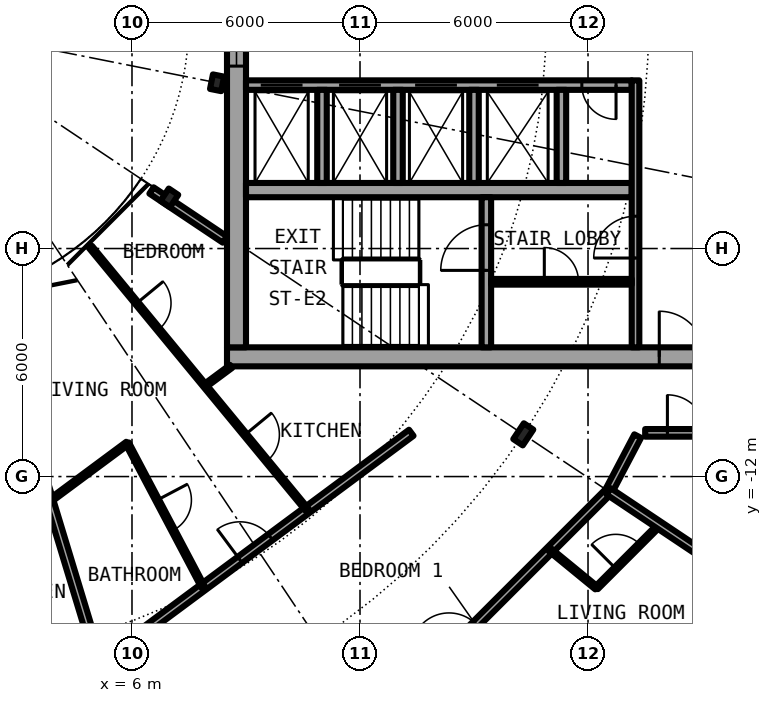
"""IFC4 building model, lengths in metres.
Left out: names, types, materials, properties, quantities, classifications, styles, units other than length and angle.
Written with IfcOpenShell. Run it as: python <this file> out.ifc"""

import sys

from ifc_helpers import new_model, si_unit, direction, frame, frame_2d, origin, origin_2d, place, context, subcontext, project, spatial, rectangle, i_section, extrude, element, fill, save


model = new_model("IFC4")
c1 = context("Model", 3, precision=1e-05, world=origin(), true_north=direction((0.0, 1.0)))
c2 = subcontext(c1, "Body", "Model", "MODEL_VIEW")
j1 = project(units=[si_unit("LENGTHUNIT", "METRE"), si_unit("PLANEANGLEUNIT", "RADIAN")], contexts=[c1])
p1 = place(None, origin())
s1 = spatial("IfcSite", under=j1, at=p1, CompositionType="ELEMENT")
p2 = place(p1, origin())
s2 = spatial("IfcBuilding", under=s1, at=p2, CompositionType="ELEMENT")
p3 = place(p2, frame((0.0, 0.0, 170.75)))
s3 = spatial("IfcBuildingStorey", under=s2, at=p3, CompositionType="ELEMENT", Elevation=170.75)
p4 = place(p3, frame((16.297, -10.889, 0.0), z_axis=(0.0, 0.0, 1.0), x_axis=(0.831469612303, -0.55557023302, 0.0)))
e1 = element("IfcColumn", 1, at=p4, inside=s3, PredefinedType="COLUMN", context=c2, shape_type="SweptSolid", body=[
    extrude(i_section(OverallWidth=0.3, OverallDepth=0.5, WebThickness=0.014, FlangeThickness=0.028, FilletRadius=0.027, at=origin_2d()), origin(), (0.0, 0.0, 1.0), 3.05),
])
for number, where, z_axis, x_axis in (
    (2, (6.984, -4.667, 0.0), (0.0, 0.0, 1.0), (0.831, -0.556, 0.0)),
    (3, (8.239, -1.639, 0.0), (0.0, 0.0, 1.0), (0.981, -0.195, 0.0)),
):
    element("IfcColumn", number, at=place(p3, frame(where, z_axis=z_axis, x_axis=x_axis)), inside=s3, PredefinedType="COLUMN", context=c2, shape_type="SweptSolid", body=[
        extrude(i_section(OverallWidth=0.3, OverallDepth=0.39, WebThickness=0.011, FlangeThickness=0.019, FilletRadius=0.027, at=origin_2d()), origin(), (0.0, 0.0, 1.0), 3.05),
    ])
p5 = place(p3, frame((19.304, -19.304, 0.0), z_axis=(0.0, 0.0, 1.0), x_axis=(0.634382322723, 0.773019449054, 0.0)))
e4 = element("IfcWall", 4, at=p5, inside=s3, PredefinedType="SOLIDWALL", context=c2, shape_type="SweptSolid", body=[
    extrude(rectangle(XDim=5.352, YDim=0.25, at=frame_2d((2.676, 0.0))), origin(), (0.0, 0.0, 1.0), 2.7),
])
p6 = place(p5, frame((0.841, 0.0, 0.0)))
e5 = element("IfcOpeningElement", 5, at=p6, cuts=e4, PredefinedType="OPENING", context=c2, shape_type="SweptSolid", body=[
    extrude(rectangle(XDim=1.0, YDim=2.2, at=frame_2d((0.5, 1.1))), frame((0.0, 0.135, 0.0), z_axis=(0.0, -1.0, 0.0), x_axis=(1.0, 0.0, 0.0)), (0.0, 0.0, 1.0), 0.27),
])
p7 = place(p5, frame((3.111, 0.0, 0.3)))
e6 = element("IfcOpeningElement", 6, at=p7, cuts=e4, PredefinedType="OPENING", context=c2, shape_type="SweptSolid", body=[
    extrude(rectangle(XDim=1.8, YDim=2.1, at=frame_2d((0.9, 1.05))), frame((0.0, 0.135, 0.0), z_axis=(0.0, -1.0, 0.0), x_axis=(1.0, 0.0, 0.0)), (0.0, 0.0, 1.0), 0.27),
])
p8 = place(p3, frame((8.5, -8.85, 0.0), z_axis=(0.0, 0.0, 1.0), x_axis=(1.0, 0.0, 0.0)))
e7 = element("IfcWall", 7, at=p8, inside=s3, PredefinedType="SHEAR", context=c2, shape_type="SweptSolid", body=[
    extrude(rectangle(XDim=13.6, YDim=0.5, at=frame_2d((6.8, 0.0))), origin(), (0.0, 0.0, 1.0), 3.05),
])
p9 = place(p8, frame((11.375, 0.0, 0.0)))
e8 = element("IfcOpeningElement", 8, at=p9, cuts=e7, PredefinedType="OPENING", context=c2, shape_type="SweptSolid", body=[
    extrude(rectangle(XDim=1.2, YDim=2.3, at=frame_2d((0.6, 1.15))), frame((0.0, 0.26, 0.0), z_axis=(0.0, -1.0, 0.0), x_axis=(1.0, 0.0, 0.0)), (0.0, 0.0, 1.0), 0.52),
])
p10 = place(p3, frame((8.75, -8.6, 0.0), z_axis=(0.0, 0.0, 1.0), x_axis=(0.0, 1.0, 0.0)))
e9 = element("IfcWall", 9, at=p10, inside=s3, PredefinedType="SHEAR", context=c2, shape_type="SweptSolid", body=[
    extrude(rectangle(XDim=17.2, YDim=0.5, at=frame_2d((8.6, 0.0))), origin(), (0.0, 0.0, 1.0), 3.05),
])
p11 = place(p10, frame((7.4, 0.0, 0.1)))
e10 = element("IfcOpeningElement", 10, at=p11, cuts=e9, PredefinedType="OPENING", context=c2, shape_type="SweptSolid", body=[
    extrude(rectangle(XDim=2.4, YDim=2.2, at=frame_2d((1.2, 1.1))), frame((0.0, 0.26, 0.0), z_axis=(0.0, -1.0, 0.0), x_axis=(1.0, 0.0, 0.0)), (0.0, 0.0, 1.0), 0.52),
])
p12 = place(p3, frame((19.15, -1.7, 0.0), z_axis=(0.0, 0.0, 1.0), x_axis=(-1.0, 0.0, 0.0)))
e11 = element("IfcWall", 11, at=p12, inside=s3, PredefinedType="SHEAR", context=c2, shape_type="SweptSolid", body=[
    extrude(rectangle(XDim=10.15, YDim=0.25, at=frame_2d((5.075, 0.0))), origin(), (0.0, 0.0, 1.0), 3.05),
])
p13 = place(p12, frame((8.663, 0.0, 0.0)))
e12 = element("IfcOpeningElement", 12, at=p13, cuts=e11, PredefinedType="OPENING", context=c2, shape_type="SweptSolid", body=[
    extrude(rectangle(XDim=1.1, YDim=2.3, at=frame_2d((0.55, 1.15))), frame((0.0, 0.135, 0.0), z_axis=(0.0, -1.0, 0.0), x_axis=(1.0, 0.0, 0.0)), (0.0, 0.0, 1.0), 0.27),
])
p14 = place(p12, frame((6.6, 0.0, 0.0)))
e13 = element("IfcOpeningElement", 13, at=p14, cuts=e11, PredefinedType="OPENING", context=c2, shape_type="SweptSolid", body=[
    extrude(rectangle(XDim=1.1, YDim=2.3, at=frame_2d((0.55, 1.15))), frame((0.0, 0.135, 0.0), z_axis=(0.0, -1.0, 0.0), x_axis=(1.0, 0.0, 0.0)), (0.0, 0.0, 1.0), 0.27),
])
p15 = place(p12, frame((4.6, 0.0, 0.0)))
e14 = element("IfcOpeningElement", 14, at=p15, cuts=e11, PredefinedType="OPENING", context=c2, shape_type="SweptSolid", body=[
    extrude(rectangle(XDim=1.1, YDim=2.3, at=frame_2d((0.55, 1.15))), frame((0.0, 0.135, 0.0), z_axis=(0.0, -1.0, 0.0), x_axis=(1.0, 0.0, 0.0)), (0.0, 0.0, 1.0), 0.27),
])
p16 = place(p12, frame((2.45, 0.0, 0.0)))
e15 = element("IfcOpeningElement", 15, at=p16, cuts=e11, PredefinedType="OPENING", context=c2, shape_type="SweptSolid", body=[
    extrude(rectangle(XDim=1.1, YDim=2.3, at=frame_2d((0.55, 1.15))), frame((0.0, 0.135, 0.0), z_axis=(0.0, -1.0, 0.0), x_axis=(1.0, 0.0, 0.0)), (0.0, 0.0, 1.0), 0.27),
])
p17 = place(p12, frame((0.413, 0.0, 0.0)))
e16 = element("IfcOpeningElement", 16, at=p17, cuts=e11, PredefinedType="OPENING", context=c2, shape_type="SweptSolid", body=[
    extrude(rectangle(XDim=0.9, YDim=2.3, at=frame_2d((0.45, 1.15))), frame((0.0, 0.135, 0.0), z_axis=(0.0, -1.0, 0.0), x_axis=(1.0, 0.0, 0.0)), (0.0, 0.0, 1.0), 0.27),
])
p18 = place(p3, frame((9.0, -4.462, 0.0), z_axis=(0.0, 0.0, 1.0), x_axis=(1.0, 0.0, 0.0)))
e17 = element("IfcWall", 17, at=p18, inside=s3, PredefinedType="SHEAR", context=c2, shape_type="SweptSolid", body=[
    extrude(rectangle(XDim=10.15, YDim=0.375, at=frame_2d((5.075, 0.0))), origin(), (0.0, 0.0, 1.0), 3.05),
])
p19 = place(p3, frame((15.325, -8.6, 0.0), z_axis=(0.0, 0.0, 1.0), x_axis=(0.0, 1.0, 0.0)))
e18 = element("IfcWall", 18, at=p19, inside=s3, PredefinedType="SHEAR", context=c2, shape_type="SweptSolid", body=[
    extrude(rectangle(XDim=3.95, YDim=0.25, at=frame_2d((1.975, 0.0))), origin(), (0.0, 0.0, 1.0), 3.05),
])
p20 = place(p19, frame((2.025, 0.0, 0.0)))
e19 = element("IfcOpeningElement", 19, at=p20, cuts=e18, PredefinedType="OPENING", context=c2, shape_type="SweptSolid", body=[
    extrude(rectangle(XDim=1.2, YDim=2.3, at=frame_2d((0.6, 1.15))), frame((0.0, 0.135, 0.0), z_axis=(0.0, -1.0, 0.0), x_axis=(1.0, 0.0, 0.0)), (0.0, 0.0, 1.0), 0.27),
])
for number, where, z_axis, x_axis in (
    (20, (15.0, -1.825, 0.0), (0.0, 0.0, 1.0), (0.0, -1.0, 0.0)),
    (21, (17.3, -1.825, 0.0), (0.0, 0.0, 1.0), (0.0, -1.0, 0.0)),
):
    element("IfcWall", number, at=place(p3, frame(where, z_axis=z_axis, x_axis=x_axis)), inside=s3, PredefinedType="SOLIDWALL", context=c2, shape_type="SweptSolid", body=[
        extrude(rectangle(XDim=2.45, YDim=0.25, at=frame_2d((1.225, 0.0))), origin(), (0.0, 0.0, 1.0), 2.7),
    ])
p21 = place(p3, frame((19.25, -8.6, 0.0), z_axis=(0.0, 0.0, 1.0), x_axis=(0.0, 1.0, 0.0)))
e22 = element("IfcWall", 22, at=p21, inside=s3, PredefinedType="SOLIDWALL", context=c2, shape_type="SweptSolid", body=[
    extrude(rectangle(XDim=7.025, YDim=0.2, at=frame_2d((3.513, 0.0))), origin(), (0.0, 0.0, 1.0), 2.7),
])
p22 = place(p21, frame((2.35, 0.0, 0.0)))
e23 = element("IfcOpeningElement", 23, at=p22, cuts=e22, PredefinedType="OPENING", context=c2, shape_type="SweptSolid", body=[
    extrude(rectangle(XDim=1.1, YDim=2.3, at=frame_2d((0.55, 1.15))), frame((0.0, 0.11, 0.0), z_axis=(0.0, -1.0, 0.0), x_axis=(1.0, 0.0, 0.0)), (0.0, 0.0, 1.0), 0.22),
])
for number, where, z_axis, x_axis in (
    (24, (11.0, -1.825, 0.0), (0.0, 0.0, 1.0), (0.0, -1.0, 0.0)),
    (25, (13.0, -1.825, 0.0), (0.0, 0.0, 1.0), (0.0, -1.0, 0.0)),
):
    element("IfcWall", number, at=place(p3, frame(where, z_axis=z_axis, x_axis=x_axis)), inside=s3, PredefinedType="SOLIDWALL", context=c2, shape_type="SweptSolid", body=[
        extrude(rectangle(XDim=2.45, YDim=0.25, at=frame_2d((1.225, 0.0))), origin(), (0.0, 0.0, 1.0), 2.7),
    ])
p23 = place(p3, frame((15.45, -6.875, 0.0), z_axis=(0.0, 0.0, 1.0), x_axis=(1.0, 0.0, 0.0)))
e26 = element("IfcWall", 26, at=p23, inside=s3, PredefinedType="PARTITIONING", context=c2, shape_type="SweptSolid", body=[
    extrude(rectangle(XDim=3.7, YDim=0.15, at=frame_2d((1.85, 0.0))), origin(), (0.0, 0.0, 1.0), 2.7),
])
p24 = place(p23, frame((1.4, 0.0, 0.0)))
e27 = element("IfcOpeningElement", 27, at=p24, cuts=e26, PredefinedType="OPENING", context=c2, shape_type="SweptSolid", body=[
    extrude(rectangle(XDim=0.9, YDim=2.3, at=frame_2d((0.45, 1.15))), frame((0.0, 0.085, 0.0), z_axis=(0.0, -1.0, 0.0), x_axis=(1.0, 0.0, 0.0)), (0.0, 0.0, 1.0), 0.17),
])
p25 = place(p3, frame((18.224, -14.927, 0.0), z_axis=(0.0, 0.0, 1.0), x_axis=(0.706897299114, 0.707316201218, 0.0)))
e28 = element("IfcWall", 28, at=p25, inside=s3, PredefinedType="PARTITIONING", context=c2, shape_type="SweptSolid", body=[
    extrude(rectangle(XDim=2.331, YDim=0.1, at=frame_2d((1.166, 0.0))), origin(), (0.0, 0.0, 1.0), 2.7),
])
p26 = place(p25, frame((0.716, 0.0, 0.0)))
e29 = element("IfcOpeningElement", 29, at=p26, cuts=e28, PredefinedType="OPENING", context=c2, shape_type="SweptSolid", body=[
    extrude(rectangle(XDim=0.9, YDim=2.3, at=frame_2d((0.45, 1.15))), frame((0.0, 0.06, 0.0), z_axis=(0.0, -1.0, 0.0), x_axis=(1.0, 0.0, 0.0)), (0.0, 0.0, 1.0), 0.12),
])
p27 = place(p3, frame((18.542, -12.389, 0.0), z_axis=(0.0, 0.0, 1.0), x_axis=(0.465605550524, 0.884992356646, 0.0)))
e30 = element("IfcWall", 30, at=p27, inside=s3, PredefinedType="PARTITIONING", context=c2, shape_type="SweptSolid", body=[
    extrude(rectangle(XDim=1.643, YDim=0.2, at=frame_2d((0.821, 0.0))), origin(), (0.0, 0.0, 1.0), 2.7),
])
p28 = place(p3, frame((12.389, -18.542, 0.0), z_axis=(0.0, 0.0, 1.0), x_axis=(0.707106781187, 0.707106781187, 0.0)))
e31 = element("IfcWall", 31, at=p28, inside=s3, PredefinedType="PARTITIONING", context=c2, shape_type="SweptSolid", body=[
    extrude(rectangle(XDim=8.702, YDim=0.2, at=frame_2d((4.351, 0.0))), origin(), (0.0, 0.0, 1.0), 2.7),
])
p29 = place(p28, frame((2.763, 0.0, 0.0)))
e32 = element("IfcOpeningElement", 32, at=p29, cuts=e31, PredefinedType="OPENING", context=c2, shape_type="SweptSolid", body=[
    extrude(rectangle(XDim=1.0, YDim=2.3, at=frame_2d((0.5, 1.15))), frame((0.0, 0.11, 0.0), z_axis=(0.0, -1.0, 0.0), x_axis=(1.0, 0.0, 0.0)), (0.0, 0.0, 1.0), 0.22),
])
p30 = place(p3, frame((5.137, -16.938, 0.0), z_axis=(0.0, 0.0, 1.0), x_axis=(0.803229232922, 0.595670042371, 0.0)))
e33 = element("IfcWall", 33, at=p30, inside=s3, PredefinedType="PARTITIONING", context=c2, shape_type="SweptSolid", body=[
    extrude(rectangle(XDim=10.224, YDim=0.2, at=frame_2d((5.112, 0.0))), origin(), (0.0, 0.0, 1.0), 2.7),
])
p31 = place(p30, frame((4.612, 0.0, 0.0)))
e34 = element("IfcOpeningElement", 34, at=p31, cuts=e33, PredefinedType="OPENING", context=c2, shape_type="SweptSolid", body=[
    extrude(rectangle(XDim=1.0, YDim=2.3, at=frame_2d((0.5, 1.15))), frame((0.0, 0.11, 0.0), z_axis=(0.0, -1.0, 0.0), x_axis=(1.0, 0.0, 0.0)), (0.0, 0.0, 1.0), 0.22),
])
p32 = place(p3, frame((3.835, -12.64, 0.0), z_axis=(0.0, 0.0, 1.0), x_axis=(0.803259509791, 0.595629213463, 0.0)))
e35 = element("IfcWall", 35, at=p32, inside=s3, PredefinedType="PARTITIONING", context=c2, shape_type="SweptSolid", body=[
    extrude(rectangle(XDim=2.543, YDim=0.1, at=frame_2d((1.272, 0.0))), origin(), (0.0, 0.0, 1.0), 2.7),
])
p33 = place(p3, frame((7.919, -9.611, 0.0), z_axis=(0.0, 0.0, 1.0), x_axis=(0.803199066515, 0.595710718007, 0.0)))
e36 = element("IfcWall", 36, at=p33, inside=s3, PredefinedType="PARTITIONING", context=c2, shape_type="SweptSolid", body=[
    extrude(rectangle(XDim=0.858, YDim=0.1, at=frame_2d((0.429, 0.0))), origin(), (0.0, 0.0, 1.0), 2.7),
])
p34 = place(p3, frame((19.504, -10.85, 0.0), z_axis=(0.0, 0.0, 1.0), x_axis=(1.0, 0.0, 0.0)))
e37 = element("IfcWall", 37, at=p34, inside=s3, PredefinedType="PARTITIONING", context=c2, shape_type="SweptSolid", body=[
    extrude(rectangle(XDim=2.171, YDim=0.2, at=frame_2d((1.085, 0.0))), origin(), (0.0, 0.0, 1.0), 2.7),
])
p35 = place(p34, frame((0.585, 0.0, 0.0)))
e38 = element("IfcOpeningElement", 38, at=p35, cuts=e37, PredefinedType="OPENING", context=c2, shape_type="SweptSolid", body=[
    extrude(rectangle(XDim=1.0, YDim=2.3, at=frame_2d((0.5, 1.15))), frame((0.0, 0.11, 0.0), z_axis=(0.0, -1.0, 0.0), x_axis=(1.0, 0.0, 0.0)), (0.0, 0.0, 1.0), 0.22),
])
p36 = place(p3, frame((6.513, -4.472, 0.0), z_axis=(0.0, 0.0, 1.0), x_axis=(0.83133816625, -0.555766905579, 0.0)))
e39 = element("IfcWall", 39, at=p36, inside=s3, PredefinedType="PARTITIONING", context=c2, shape_type="SweptSolid", body=[
    extrude(rectangle(XDim=2.323, YDim=0.2, at=frame_2d((1.162, 0.0))), origin(), (0.0, 0.0, 1.0), 2.7),
])
p37 = place(p3, frame((2.241, -7.388, 0.0), z_axis=(0.0, 0.0, 1.0), x_axis=(0.290284403441, -0.956940418793, 0.0)))
e40 = element("IfcWall", 40, at=p37, inside=s3, PredefinedType="PARTITIONING", context=c2, shape_type="SweptSolid", body=[
    extrude(rectangle(XDim=9.98, YDim=0.2, at=frame_2d((4.99, 0.0))), origin(), (0.0, 0.0, 1.0), 2.7),
])
p38 = place(p3, frame((4.908, -5.959, 0.0), z_axis=(0.0, 0.0, 1.0), x_axis=(0.636115614725, -0.771593756262, 0.0)))
e41 = element("IfcWall", 41, at=p38, inside=s3, PredefinedType="PARTITIONING", context=c2, shape_type="SweptSolid", body=[
    extrude(rectangle(XDim=8.967, YDim=0.1, at=frame_2d((4.483, 0.0))), origin(), (0.0, 0.0, 1.0), 2.7),
])
p39 = place(p38, frame((6.4, 0.0, 0.0)))
e42 = element("IfcOpeningElement", 42, at=p39, cuts=e41, PredefinedType="OPENING", context=c2, shape_type="SweptSolid", body=[
    extrude(rectangle(XDim=0.9, YDim=2.3, at=frame_2d((0.45, 1.15))), frame((0.0, 0.06, 0.0), z_axis=(0.0, -1.0, 0.0), x_axis=(1.0, 0.0, 0.0)), (0.0, 0.0, 1.0), 0.12),
])
p40 = place(p38, frame((1.917, 0.0, 0.0)))
e43 = element("IfcOpeningElement", 43, at=p40, cuts=e41, PredefinedType="OPENING", context=c2, shape_type="SweptSolid", body=[
    extrude(rectangle(XDim=0.9, YDim=2.3, at=frame_2d((0.45, 1.15))), frame((0.0, 0.06, 0.0), z_axis=(0.0, -1.0, 0.0), x_axis=(1.0, 0.0, 0.0)), (0.0, 0.0, 1.0), 0.12),
])
p41 = place(p3, frame((5.875, -11.126, 0.0), z_axis=(0.0, 0.0, 1.0), x_axis=(0.467030118529, -0.884241408432, 0.0)))
e44 = element("IfcWall", 44, at=p41, inside=s3, PredefinedType="PARTITIONING", context=c2, shape_type="SweptSolid", body=[
    extrude(rectangle(XDim=4.278, YDim=0.1, at=frame_2d((2.139, 0.0))), origin(), (0.0, 0.0, 1.0), 2.7),
])
p42 = place(p41, frame((1.689, 0.0, 0.0)))
e45 = element("IfcOpeningElement", 45, at=p42, cuts=e44, PredefinedType="OPENING", context=c2, shape_type="SweptSolid", body=[
    extrude(rectangle(XDim=0.9, YDim=2.3, at=frame_2d((0.45, 1.15))), frame((0.0, 0.06, 0.0), z_axis=(0.0, -1.0, 0.0), x_axis=(1.0, 0.0, 0.0)), (0.0, 0.0, 1.0), 0.12),
])
p43 = place(p3, frame((17.001, -13.93, 0.0), z_axis=(0.0, 0.0, 1.0), x_axis=(0.773633255921, -0.633633636523, 0.0)))
e46 = element("IfcWall", 46, at=p43, inside=s3, PredefinedType="PARTITIONING", context=c2, shape_type="SweptSolid", body=[
    extrude(rectangle(XDim=1.578, YDim=0.1, at=frame_2d((0.789, 0.0))), origin(), (0.0, 0.0, 1.0), 2.7),
])
p44 = place(p3, frame((18.542, -12.389, 0.0), z_axis=(0.0, 0.0, 1.0), x_axis=(0.831387096605, -0.55569370664, 0.0)))
e47 = element("IfcWall", 47, at=p44, inside=s3, PredefinedType="PARTITIONING", context=c2, shape_type="SweptSolid", body=[
    extrude(rectangle(XDim=4.875, YDim=0.2, at=frame_2d((2.438, 0.0))), origin(), (0.0, 0.0, 1.0), 2.7),
])
p45 = place(p13, origin())
e48 = element("IfcDoor", 48, at=p45, inside=s3, OperationType="DOUBLE_DOOR_SLIDING", PredefinedType="DOOR", context=c2, shape_type="SweptSolid", body=[
    extrude(rectangle(XDim=1.1, YDim=2.3, at=frame_2d((0.55, 1.15))), frame((0.0, 0.025, 0.0), z_axis=(0.0, -1.0, 0.0), x_axis=(1.0, 0.0, 0.0)), (0.0, 0.0, 1.0), 0.05),
])
fill(e12, e48)
p46 = place(p14, origin())
e49 = element("IfcDoor", 49, at=p46, inside=s3, OperationType="DOUBLE_DOOR_SLIDING", PredefinedType="DOOR", context=c2, shape_type="SweptSolid", body=[
    extrude(rectangle(XDim=1.1, YDim=2.3, at=frame_2d((0.55, 1.15))), frame((0.0, 0.025, 0.0), z_axis=(0.0, -1.0, 0.0), x_axis=(1.0, 0.0, 0.0)), (0.0, 0.0, 1.0), 0.05),
])
fill(e13, e49)
p47 = place(p15, origin())
e50 = element("IfcDoor", 50, at=p47, inside=s3, OperationType="DOUBLE_DOOR_SLIDING", PredefinedType="DOOR", context=c2, shape_type="SweptSolid", body=[
    extrude(rectangle(XDim=1.1, YDim=2.3, at=frame_2d((0.55, 1.15))), frame((0.0, 0.025, 0.0), z_axis=(0.0, -1.0, 0.0), x_axis=(1.0, 0.0, 0.0)), (0.0, 0.0, 1.0), 0.05),
])
fill(e14, e50)
p48 = place(p16, origin())
e51 = element("IfcDoor", 51, at=p48, inside=s3, OperationType="DOUBLE_DOOR_SLIDING", PredefinedType="DOOR", context=c2, shape_type="SweptSolid", body=[
    extrude(rectangle(XDim=1.1, YDim=2.3, at=frame_2d((0.55, 1.15))), frame((0.0, 0.025, 0.0), z_axis=(0.0, -1.0, 0.0), x_axis=(1.0, 0.0, 0.0)), (0.0, 0.0, 1.0), 0.05),
])
fill(e15, e51)
p49 = place(p17, origin())
e52 = element("IfcDoor", 52, at=p49, inside=s3, OperationType="SINGLE_SWING_RIGHT", PredefinedType="DOOR", context=c2, shape_type="SweptSolid", body=[
    extrude(rectangle(XDim=0.9, YDim=2.3, at=frame_2d((0.45, 1.15))), frame((0.0, 0.025, 0.0), z_axis=(0.0, -1.0, 0.0), x_axis=(1.0, 0.0, 0.0)), (0.0, 0.0, 1.0), 0.05),
])
fill(e16, e52)
p50 = place(p24, origin())
e53 = element("IfcDoor", 53, at=p50, inside=s3, OperationType="SINGLE_SWING_LEFT", PredefinedType="DOOR", context=c2, shape_type="SweptSolid", body=[
    extrude(rectangle(XDim=0.9, YDim=2.3, at=frame_2d((0.45, 1.15))), frame((0.0, 0.025, 0.0), z_axis=(0.0, -1.0, 0.0), x_axis=(1.0, 0.0, 0.0)), (0.0, 0.0, 1.0), 0.05),
])
fill(e27, e53)
p51 = place(p20, origin())
e54 = element("IfcDoor", 54, at=p51, inside=s3, OperationType="SINGLE_SWING_LEFT", PredefinedType="DOOR", context=c2, shape_type="SweptSolid", body=[
    extrude(rectangle(XDim=1.2, YDim=2.3, at=frame_2d((0.6, 1.15))), frame((0.0, 0.025, 0.0), z_axis=(0.0, -1.0, 0.0), x_axis=(1.0, 0.0, 0.0)), (0.0, 0.0, 1.0), 0.05),
])
fill(e19, e54)
p52 = place(p22, origin())
e55 = element("IfcDoor", 55, at=p52, inside=s3, OperationType="SINGLE_SWING_RIGHT", PredefinedType="DOOR", context=c2, shape_type="SweptSolid", body=[
    extrude(rectangle(XDim=1.1, YDim=2.3, at=frame_2d((0.55, 1.15))), frame((0.0, 0.025, 0.0), z_axis=(0.0, -1.0, 0.0), x_axis=(1.0, 0.0, 0.0)), (0.0, 0.0, 1.0), 0.05),
])
fill(e23, e55)
p53 = place(p9, origin())
e56 = element("IfcDoor", 56, at=p53, inside=s3, OperationType="SINGLE_SWING_LEFT", PredefinedType="DOOR", context=c2, shape_type="SweptSolid", body=[
    extrude(rectangle(XDim=1.2, YDim=2.3, at=frame_2d((0.6, 1.15))), frame((0.0, 0.025, 0.0), z_axis=(0.0, -1.0, 0.0), x_axis=(1.0, 0.0, 0.0)), (0.0, 0.0, 1.0), 0.05),
])
fill(e8, e56)
p54 = place(p11, origin())
e57 = element("IfcWindow", 57, at=p54, inside=s3, PartitioningType="SINGLE_PANEL", PredefinedType="WINDOW", context=c2, shape_type="SweptSolid", body=[
    extrude(rectangle(XDim=2.4, YDim=2.2, at=frame_2d((1.2, 1.1))), frame((0.0, 0.03, 0.0), z_axis=(0.0, -1.0, 0.0), x_axis=(1.0, 0.0, 0.0)), (0.0, 0.0, 1.0), 0.06),
])
fill(e10, e57)
p55 = place(p26, origin())
e58 = element("IfcDoor", 58, at=p55, inside=s3, OperationType="SINGLE_SWING_RIGHT", PredefinedType="DOOR", context=c2, shape_type="SweptSolid", body=[
    extrude(rectangle(XDim=0.9, YDim=2.3, at=frame_2d((0.45, 1.15))), frame((0.0, 0.025, 0.0), z_axis=(0.0, -1.0, 0.0), x_axis=(1.0, 0.0, 0.0)), (0.0, 0.0, 1.0), 0.05),
])
fill(e29, e58)
p56 = place(p31, origin())
e59 = element("IfcDoor", 59, at=p56, inside=s3, OperationType="SINGLE_SWING_RIGHT", PredefinedType="DOOR", context=c2, shape_type="SweptSolid", body=[
    extrude(rectangle(XDim=1.0, YDim=2.3, at=frame_2d((0.5, 1.15))), frame((0.0, 0.025, 0.0), z_axis=(0.0, -1.0, 0.0), x_axis=(1.0, 0.0, 0.0)), (0.0, 0.0, 1.0), 0.05),
])
fill(e34, e59)
p57 = place(p42, origin())
e60 = element("IfcDoor", 60, at=p57, inside=s3, OperationType="SINGLE_SWING_RIGHT", PredefinedType="DOOR", context=c2, shape_type="SweptSolid", body=[
    extrude(rectangle(XDim=0.9, YDim=2.3, at=frame_2d((0.45, 1.15))), frame((0.0, 0.025, 0.0), z_axis=(0.0, -1.0, 0.0), x_axis=(1.0, 0.0, 0.0)), (0.0, 0.0, 1.0), 0.05),
])
fill(e45, e60)
p58 = place(p39, origin())
e61 = element("IfcDoor", 61, at=p58, inside=s3, OperationType="SINGLE_SWING_RIGHT", PredefinedType="DOOR", context=c2, shape_type="SweptSolid", body=[
    extrude(rectangle(XDim=0.9, YDim=2.3, at=frame_2d((0.45, 1.15))), frame((0.0, 0.025, 0.0), z_axis=(0.0, -1.0, 0.0), x_axis=(1.0, 0.0, 0.0)), (0.0, 0.0, 1.0), 0.05),
])
fill(e42, e61)
p59 = place(p40, origin())
e62 = element("IfcDoor", 62, at=p59, inside=s3, OperationType="SINGLE_SWING_LEFT", PredefinedType="DOOR", context=c2, shape_type="SweptSolid", body=[
    extrude(rectangle(XDim=0.9, YDim=2.3, at=frame_2d((0.45, 1.15))), frame((0.0, 0.025, 0.0), z_axis=(0.0, -1.0, 0.0), x_axis=(1.0, 0.0, 0.0)), (0.0, 0.0, 1.0), 0.05),
])
fill(e43, e62)
p60 = place(p35, origin())
e63 = element("IfcDoor", 63, at=p60, inside=s3, OperationType="SINGLE_SWING_LEFT", PredefinedType="DOOR", context=c2, shape_type="SweptSolid", body=[
    extrude(rectangle(XDim=1.0, YDim=2.3, at=frame_2d((0.5, 1.15))), frame((0.0, 0.025, 0.0), z_axis=(0.0, -1.0, 0.0), x_axis=(1.0, 0.0, 0.0)), (0.0, 0.0, 1.0), 0.05),
])
fill(e38, e63)
save(model, sys.argv[1])
